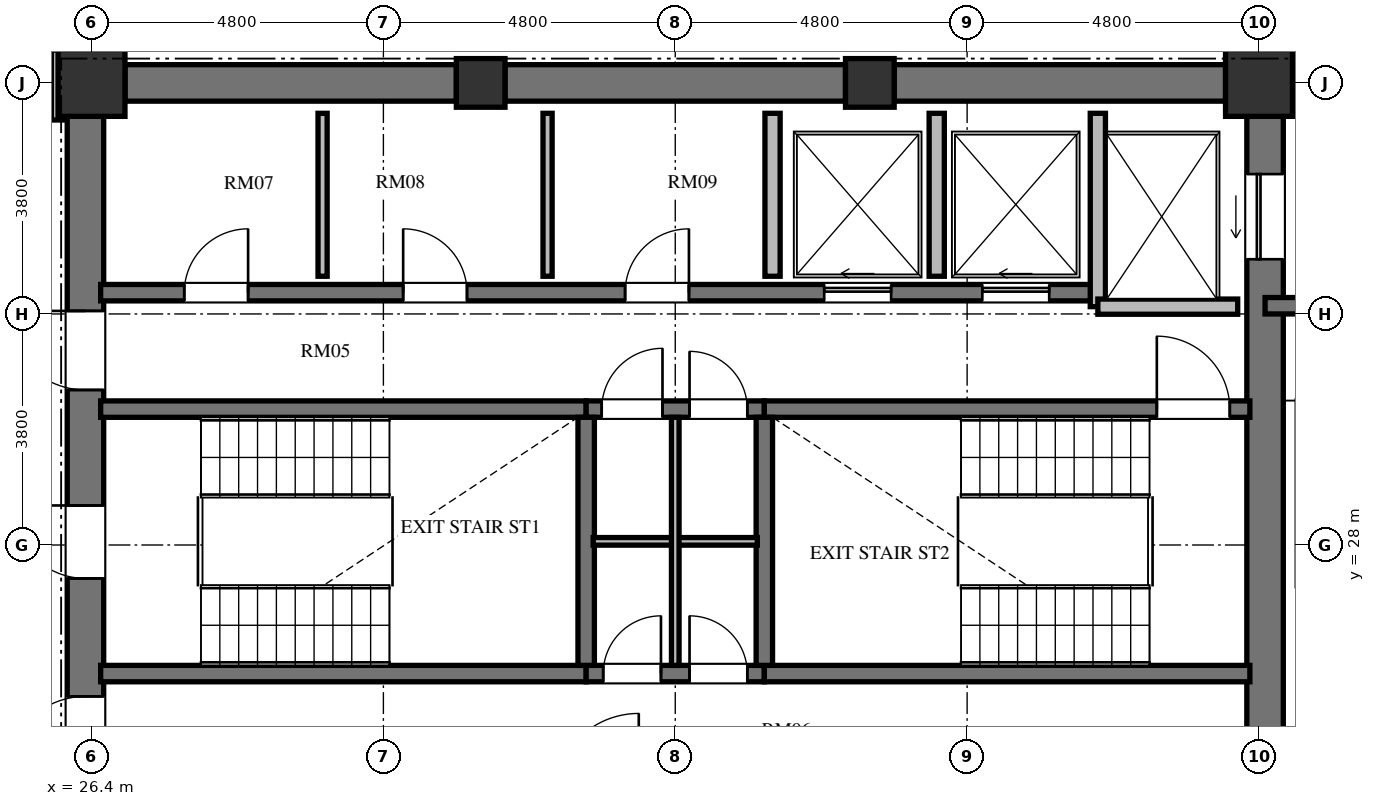
"""IFC4 building model, lengths in metres.
Left out: names, types, materials, properties, quantities, classifications, styles, units other than length and angle.
Written with IfcOpenShell. Run it as: python <this file> out.ifc"""

import sys

from ifc_helpers import new_model, si_unit, direction, frame, frame_2d, origin, origin_2d, place, context, subcontext, project, spatial, rectangle, extrude, element, fill, save


model = new_model("IFC4")
c1 = context("Model", 3, precision=1e-05, world=origin(), true_north=direction((0.0, 1.0)))
c2 = subcontext(c1, "Body", "Model", "MODEL_VIEW")
j1 = project(units=[si_unit("LENGTHUNIT", "METRE"), si_unit("PLANEANGLEUNIT", "RADIAN")], contexts=[c1])
p1 = place(None, origin())
s1 = spatial("IfcSite", under=j1, at=p1, CompositionType="ELEMENT")
p2 = place(p1, origin())
s2 = spatial("IfcBuilding", under=s1, at=p2, CompositionType="ELEMENT")
p3 = place(p2, frame((0.0, 0.0, 209.424)))
s3 = spatial("IfcBuildingStorey", under=s2, at=p3, CompositionType="ELEMENT", Elevation=209.424)
p4 = place(p3, frame((45.6, 35.6, 0.0), z_axis=(0.0, 0.0, 1.0), x_axis=(1.0, 0.0, 0.0)))
e1 = element("IfcColumn", 1, at=p4, inside=s3, PredefinedType="COLUMN", context=c2, shape_type="SweptSolid", body=[
    extrude(rectangle(XDim=1.1, YDim=1.1, at=origin_2d()), origin(), (0.0, 0.0, 1.0), 3.648),
])
for number, where, z_axis, x_axis in (
    (2, (39.2, 35.6, 0.0), (0.0, 0.0, 1.0), (1.0, 0.0, 0.0)),
    (3, (32.8, 35.6, 0.0), (0.0, 0.0, 1.0), (1.0, 0.0, 0.0)),
):
    element("IfcColumn", number, at=place(p3, frame(where, z_axis=z_axis, x_axis=x_axis)), inside=s3, PredefinedType="COLUMN", context=c2, shape_type="SweptSolid", body=[
        extrude(rectangle(XDim=0.8, YDim=0.8, at=origin_2d()), origin(), (0.0, 0.0, 1.0), 3.648),
    ])
p5 = place(p3, frame((26.4, 35.6, 0.0), z_axis=(0.0, 0.0, 1.0), x_axis=(1.0, 0.0, 0.0)))
e4 = element("IfcColumn", 4, at=p5, inside=s3, PredefinedType="COLUMN", context=c2, shape_type="SweptSolid", body=[
    extrude(rectangle(XDim=1.1, YDim=1.1, at=origin_2d()), origin(), (0.0, 0.0, 1.0), 3.648),
])
p6 = place(p3, frame((26.3, 20.95, 0.0), z_axis=(0.0, 0.0, 1.0), x_axis=(0.0, 1.0, 0.0)))
e5 = element("IfcWall", 5, at=p6, inside=s3, PredefinedType="SHEAR", context=c2, shape_type="SweptSolid", body=[
    extrude(rectangle(XDim=14.1, YDim=0.6, at=frame_2d((7.05, 0.0))), origin(), (0.0, 0.0, 1.0), 3.648),
])
p7 = place(p6, frame((6.5, 0.0, 0.0)))
e6 = element("IfcOpeningElement", 6, at=p7, cuts=e5, PredefinedType="OPENING", context=c2, shape_type="SweptSolid", body=[
    extrude(rectangle(XDim=1.2, YDim=2.15, at=frame_2d((0.6, 1.075))), frame((0.0, 0.31, 0.0), z_axis=(0.0, -1.0, 0.0), x_axis=(1.0, 0.0, 0.0)), (0.0, 0.0, 1.0), 0.62),
])
p8 = place(p6, frame((9.6, 0.0, 0.0)))
e7 = element("IfcOpeningElement", 7, at=p8, cuts=e5, PredefinedType="OPENING", context=c2, shape_type="SweptSolid", body=[
    extrude(rectangle(XDim=1.3, YDim=2.2, at=frame_2d((0.65, 1.1))), frame((0.0, 0.31, 0.0), z_axis=(0.0, -1.0, 0.0), x_axis=(1.0, 0.0, 0.0)), (0.0, 0.0, 1.0), 0.62),
])
p9 = place(p6, frame((3.26, 0.0, 0.0)))
e8 = element("IfcOpeningElement", 8, at=p9, cuts=e5, PredefinedType="OPENING", context=c2, shape_type="SweptSolid", body=[
    extrude(rectangle(XDim=1.3, YDim=2.2, at=frame_2d((0.65, 1.1))), frame((0.0, 0.31, 0.0), z_axis=(0.0, -1.0, 0.0), x_axis=(1.0, 0.0, 0.0)), (0.0, 0.0, 1.0), 0.62),
])
p10 = place(p3, frame((45.7, 20.95, 0.0), z_axis=(0.0, 0.0, 1.0), x_axis=(0.0, 1.0, 0.0)))
e9 = element("IfcWall", 9, at=p10, inside=s3, PredefinedType="SHEAR", context=c2, shape_type="SweptSolid", body=[
    extrude(rectangle(XDim=14.1, YDim=0.6, at=frame_2d((7.05, 0.0))), origin(), (0.0, 0.0, 1.0), 3.648),
])
p11 = place(p10, frame((11.75, 0.0, 0.0)))
e10 = element("IfcOpeningElement", 10, at=p11, cuts=e9, PredefinedType="OPENING", context=c2, shape_type="SweptSolid", body=[
    extrude(rectangle(XDim=1.4, YDim=2.3, at=frame_2d((0.7, 1.15))), frame((0.0, 0.31, 0.0), z_axis=(0.0, -1.0, 0.0), x_axis=(1.0, 0.0, 0.0)), (0.0, 0.0, 1.0), 0.62),
])
p12 = place(p10, frame((0.95, 0.0, 0.0)))
e11 = element("IfcOpeningElement", 11, at=p12, cuts=e9, PredefinedType="OPENING", context=c2, shape_type="SweptSolid", body=[
    extrude(rectangle(XDim=1.4, YDim=2.3, at=frame_2d((0.7, 1.15))), frame((0.0, 0.31, 0.0), z_axis=(0.0, -1.0, 0.0), x_axis=(1.0, 0.0, 0.0)), (0.0, 0.0, 1.0), 0.62),
])
p13 = place(p3, frame((26.95, 35.6, 0.0), z_axis=(0.0, 0.0, 1.0), x_axis=(1.0, 0.0, 0.0)))
e12 = element("IfcWall", 12, at=p13, inside=s3, PredefinedType="SHEAR", context=c2, shape_type="SweptSolid", body=[
    extrude(rectangle(XDim=5.45, YDim=0.6, at=frame_2d((2.725, 0.0))), origin(), (0.0, 0.0, 1.0), 3.648),
])
p14 = place(p3, frame((33.2, 35.6, 0.0), z_axis=(0.0, 0.0, 1.0), x_axis=(1.0, 0.0, 0.0)))
e13 = element("IfcWall", 13, at=p14, inside=s3, PredefinedType="SHEAR", context=c2, shape_type="SweptSolid", body=[
    extrude(rectangle(XDim=5.6, YDim=0.6, at=frame_2d((2.8, 0.0))), origin(), (0.0, 0.0, 1.0), 3.648),
])
p15 = place(p3, frame((39.6, 35.6, 0.0), z_axis=(0.0, 0.0, 1.0), x_axis=(1.0, 0.0, 0.0)))
e14 = element("IfcWall", 14, at=p15, inside=s3, PredefinedType="SHEAR", context=c2, shape_type="SweptSolid", body=[
    extrude(rectangle(XDim=5.45, YDim=0.6, at=frame_2d((2.725, 0.0))), origin(), (0.0, 0.0, 1.0), 3.648),
])
p16 = place(p3, frame((26.55, 30.235, 0.0), z_axis=(0.0, 0.0, 1.0), x_axis=(1.0, 0.0, 0.0)))
e15 = element("IfcWall", 15, at=p16, inside=s3, PredefinedType="SHEAR", context=c2, shape_type="SweptSolid", body=[
    extrude(rectangle(XDim=7.985, YDim=0.27, at=frame_2d((3.992, 0.0))), origin(), (0.0, 0.0, 1.0), 3.648),
])
p17 = place(p3, frame((34.535, 30.235, 0.0), z_axis=(0.0, 0.0, 1.0), x_axis=(1.0, 0.0, 0.0)))
e16 = element("IfcWall", 16, at=p17, inside=s3, PredefinedType="SHEAR", context=c2, shape_type="SweptSolid", body=[
    extrude(rectangle(XDim=2.93, YDim=0.27, at=frame_2d((1.465, 0.0))), origin(), (0.0, 0.0, 1.0), 3.648),
])
p18 = place(p17, frame((0.255, 0.0, 0.0)))
e17 = element("IfcOpeningElement", 17, at=p18, cuts=e16, PredefinedType="OPENING", context=c2, shape_type="SweptSolid", body=[
    extrude(rectangle(XDim=1.0, YDim=2.1, at=frame_2d((0.5, 1.05))), frame((0.0, 0.145, 0.0), z_axis=(0.0, -1.0, 0.0), x_axis=(1.0, 0.0, 0.0)), (0.0, 0.0, 1.0), 0.29),
])
p19 = place(p17, frame((1.7, 0.0, 0.0)))
e18 = element("IfcOpeningElement", 18, at=p19, cuts=e16, PredefinedType="OPENING", context=c2, shape_type="SweptSolid", body=[
    extrude(rectangle(XDim=0.95, YDim=2.1, at=frame_2d((0.475, 1.05))), frame((0.0, 0.145, 0.0), z_axis=(0.0, -1.0, 0.0), x_axis=(1.0, 0.0, 0.0)), (0.0, 0.0, 1.0), 0.29),
])
p20 = place(p3, frame((37.465, 30.235, 0.0), z_axis=(0.0, 0.0, 1.0), x_axis=(1.0, 0.0, 0.0)))
e19 = element("IfcWall", 19, at=p20, inside=s3, PredefinedType="SHEAR", context=c2, shape_type="SweptSolid", body=[
    extrude(rectangle(XDim=7.985, YDim=0.27, at=frame_2d((3.992, 0.0))), origin(), (0.0, 0.0, 1.0), 3.648),
])
p21 = place(p20, frame((6.455, 0.0, 0.0)))
e20 = element("IfcOpeningElement", 20, at=p21, cuts=e19, PredefinedType="OPENING", context=c2, shape_type="SweptSolid", body=[
    extrude(rectangle(XDim=1.2, YDim=2.15, at=frame_2d((0.6, 1.075))), frame((0.0, 0.145, 0.0), z_axis=(0.0, -1.0, 0.0), x_axis=(1.0, 0.0, 0.0)), (0.0, 0.0, 1.0), 0.29),
])
p22 = place(p3, frame((26.55, 25.885, 0.0), z_axis=(0.0, 0.0, 1.0), x_axis=(1.0, 0.0, 0.0)))
e21 = element("IfcWall", 21, at=p22, inside=s3, PredefinedType="SHEAR", context=c2, shape_type="SweptSolid", body=[
    extrude(rectangle(XDim=7.985, YDim=0.27, at=frame_2d((3.992, 0.0))), origin(), (0.0, 0.0, 1.0), 3.648),
])
p23 = place(p3, frame((34.535, 25.885, 0.0), z_axis=(0.0, 0.0, 1.0), x_axis=(1.0, 0.0, 0.0)))
e22 = element("IfcWall", 22, at=p23, inside=s3, PredefinedType="SHEAR", context=c2, shape_type="SweptSolid", body=[
    extrude(rectangle(XDim=2.93, YDim=0.27, at=frame_2d((1.465, 0.0))), origin(), (0.0, 0.0, 1.0), 3.648),
])
p24 = place(p23, frame((0.28, 0.0, 0.0)))
e23 = element("IfcOpeningElement", 23, at=p24, cuts=e22, PredefinedType="OPENING", context=c2, shape_type="SweptSolid", body=[
    extrude(rectangle(XDim=0.95, YDim=2.1, at=frame_2d((0.475, 1.05))), frame((0.0, 0.145, 0.0), z_axis=(0.0, -1.0, 0.0), x_axis=(1.0, 0.0, 0.0)), (0.0, 0.0, 1.0), 0.29),
])
p25 = place(p23, frame((1.7, 0.0, 0.0)))
e24 = element("IfcOpeningElement", 24, at=p25, cuts=e22, PredefinedType="OPENING", context=c2, shape_type="SweptSolid", body=[
    extrude(rectangle(XDim=0.95, YDim=2.1, at=frame_2d((0.475, 1.05))), frame((0.0, 0.145, 0.0), z_axis=(0.0, -1.0, 0.0), x_axis=(1.0, 0.0, 0.0)), (0.0, 0.0, 1.0), 0.29),
])
p26 = place(p3, frame((37.465, 25.885, 0.0), z_axis=(0.0, 0.0, 1.0), x_axis=(1.0, 0.0, 0.0)))
e25 = element("IfcWall", 25, at=p26, inside=s3, PredefinedType="SHEAR", context=c2, shape_type="SweptSolid", body=[
    extrude(rectangle(XDim=7.985, YDim=0.27, at=frame_2d((3.992, 0.0))), origin(), (0.0, 0.0, 1.0), 3.648),
])
for number, where, z_axis, x_axis in (
    (26, (34.535, 26.02, 0.0), (0.0, 0.0, 1.0), (0.0, 1.0, 0.0)),
    (27, (37.465, 26.02, 0.0), (0.0, 0.0, 1.0), (0.0, 1.0, 0.0)),
):
    element("IfcWall", number, at=place(p3, frame(where, z_axis=z_axis, x_axis=x_axis)), inside=s3, PredefinedType="SHEAR", context=c2, shape_type="SweptSolid", body=[
        extrude(rectangle(XDim=4.08, YDim=0.27, at=frame_2d((2.04, 0.0))), origin(), (0.0, 0.0, 1.0), 3.648),
    ])
p27 = place(p3, frame((34.65, 28.06, 0.0), z_axis=(0.0, 0.0, 1.0), x_axis=(1.0, 0.0, 0.0)))
e28 = element("IfcWall", 28, at=p27, inside=s3, PredefinedType="PARTITIONING", context=c2, shape_type="SweptSolid", body=[
    extrude(rectangle(XDim=2.7, YDim=0.125, at=frame_2d((1.35, 0.0))), origin(), (0.0, 0.0, 1.0), 3.448),
])
p28 = place(p3, frame((36.0, 26.02, 0.0), z_axis=(0.0, 0.0, 1.0), x_axis=(0.0, 1.0, 0.0)))
e29 = element("IfcWall", 29, at=p28, inside=s3, PredefinedType="PARTITIONING", context=c2, shape_type="SweptSolid", body=[
    extrude(rectangle(XDim=4.08, YDim=0.125, at=frame_2d((2.04, 0.0))), origin(), (0.0, 0.0, 1.0), 3.448),
])
p29 = place(p3, frame((26.55, 32.15, 0.0), z_axis=(0.0, 0.0, 1.0), x_axis=(1.0, 0.0, 0.0)))
e30 = element("IfcWall", 30, at=p29, inside=s3, PredefinedType="SHEAR", context=c2, shape_type="SweptSolid", body=[
    extrude(rectangle(XDim=16.4, YDim=0.27, at=frame_2d((8.2, 0.0))), origin(), (0.0, 0.0, 1.0), 3.648),
])
p30 = place(p29, frame((1.375, 0.0, 0.0)))
e31 = element("IfcOpeningElement", 31, at=p30, cuts=e30, PredefinedType="OPENING", context=c2, shape_type="SweptSolid", body=[
    extrude(rectangle(XDim=1.05, YDim=2.15, at=frame_2d((0.525, 1.075))), frame((0.0, 0.145, 0.0), z_axis=(0.0, -1.0, 0.0), x_axis=(1.0, 0.0, 0.0)), (0.0, 0.0, 1.0), 0.29),
])
p31 = place(p29, frame((4.975, 0.0, 0.0)))
e32 = element("IfcOpeningElement", 32, at=p31, cuts=e30, PredefinedType="OPENING", context=c2, shape_type="SweptSolid", body=[
    extrude(rectangle(XDim=1.05, YDim=2.15, at=frame_2d((0.525, 1.075))), frame((0.0, 0.145, 0.0), z_axis=(0.0, -1.0, 0.0), x_axis=(1.0, 0.0, 0.0)), (0.0, 0.0, 1.0), 0.29),
])
p32 = place(p29, frame((8.625, 0.0, 0.0)))
e33 = element("IfcOpeningElement", 33, at=p32, cuts=e30, PredefinedType="OPENING", context=c2, shape_type="SweptSolid", body=[
    extrude(rectangle(XDim=1.05, YDim=2.15, at=frame_2d((0.525, 1.075))), frame((0.0, 0.145, 0.0), z_axis=(0.0, -1.0, 0.0), x_axis=(1.0, 0.0, 0.0)), (0.0, 0.0, 1.0), 0.29),
])
p33 = place(p29, frame((11.9, 0.0, 0.0)))
e34 = element("IfcOpeningElement", 34, at=p33, cuts=e30, PredefinedType="OPENING", context=c2, shape_type="SweptSolid", body=[
    extrude(rectangle(XDim=1.1, YDim=2.2, at=frame_2d((0.55, 1.1))), frame((0.0, 0.145, 0.0), z_axis=(0.0, -1.0, 0.0), x_axis=(1.0, 0.0, 0.0)), (0.0, 0.0, 1.0), 0.29),
])
p34 = place(p29, frame((14.5, 0.0, 0.0)))
e35 = element("IfcOpeningElement", 35, at=p34, cuts=e30, PredefinedType="OPENING", context=c2, shape_type="SweptSolid", body=[
    extrude(rectangle(XDim=1.1, YDim=2.2, at=frame_2d((0.55, 1.1))), frame((0.0, 0.145, 0.0), z_axis=(0.0, -1.0, 0.0), x_axis=(1.0, 0.0, 0.0)), (0.0, 0.0, 1.0), 0.29),
])
p35 = place(p3, frame((42.95, 31.92, 0.0), z_axis=(0.0, 0.0, 1.0), x_axis=(0.0, 1.0, 0.0)))
e36 = element("IfcWall", 36, at=p35, inside=s3, PredefinedType="SOLIDWALL", context=c2, shape_type="SweptSolid", body=[
    extrude(rectangle(XDim=3.18, YDim=0.25, at=frame_2d((1.59, 0.0))), origin(), (0.0, 0.0, 1.0), 3.448),
])
p36 = place(p3, frame((42.95, 31.92, 0.0), z_axis=(0.0, 0.0, 1.0), x_axis=(1.0, 0.0, 0.0)))
e37 = element("IfcWall", 37, at=p36, inside=s3, PredefinedType="SOLIDWALL", context=c2, shape_type="SweptSolid", body=[
    extrude(rectangle(XDim=2.3, YDim=0.25, at=frame_2d((1.15, 0.0))), origin(), (0.0, 0.0, 1.0), 3.448),
])
for number, where, z_axis, x_axis in (
    (38, (37.6, 32.42, 0.0), (0.0, 0.0, 1.0), (0.0, 1.0, 0.0)),
    (39, (40.3, 32.42, 0.0), (0.0, 0.0, 1.0), (0.0, 1.0, 0.0)),
):
    element("IfcWall", number, at=place(p3, frame(where, z_axis=z_axis, x_axis=x_axis)), inside=s3, PredefinedType="SOLIDWALL", context=c2, shape_type="SweptSolid", body=[
        extrude(rectangle(XDim=2.68, YDim=0.25, at=frame_2d((1.34, 0.0))), origin(), (0.0, 0.0, 1.0), 3.448),
    ])
for number, where, z_axis, x_axis in (
    (40, (30.2, 32.42, 0.0), (0.0, 0.0, 1.0), (0.0, 1.0, 0.0)),
    (41, (33.9, 32.42, 0.0), (0.0, 0.0, 1.0), (0.0, 1.0, 0.0)),
):
    element("IfcWall", number, at=place(p3, frame(where, z_axis=z_axis, x_axis=x_axis)), inside=s3, PredefinedType="PARTITIONING", context=c2, shape_type="SweptSolid", body=[
        extrude(rectangle(XDim=2.68, YDim=0.15, at=frame_2d((1.34, 0.0))), origin(), (0.0, 0.0, 1.0), 3.448),
    ])
p37 = place(p3, frame((46.0, 35.98, 0.0), z_axis=(0.0, 0.0, 1.0), x_axis=(1.0, 0.0, 0.0)))
e42 = element("IfcWall", 42, at=p37, inside=s3, PredefinedType="SHEAR", context=c2, shape_type="SweptSolid", body=[
    extrude(rectangle(XDim=4.55, YDim=0.27, at=frame_2d((2.275, 0.0))), origin(), (0.0, 0.0, 1.0), 3.648),
])
p38 = place(p3, frame((45.7, 31.935, 0.0), z_axis=(0.0, 0.0, 1.0), x_axis=(1.0, 0.0, 0.0)))
e43 = element("IfcWall", 43, at=p38, inside=s3, PredefinedType="SHEAR", context=c2, shape_type="SweptSolid", body=[
    extrude(rectangle(XDim=4.715, YDim=0.27, at=frame_2d((2.357, 0.0))), origin(), (0.0, 0.0, 1.0), 3.648),
])
p39 = place(p3, frame((25.83, 36.14, 0.0), z_axis=(0.0, 0.0, 1.0), x_axis=(0.0, -1.0, 0.0)))
e44 = element("IfcWall", 44, at=p39, inside=s3, PredefinedType="PARTITIONING", context=c2, shape_type="SweptSolid", body=[
    extrude(rectangle(XDim=1.15, YDim=0.18, at=frame_2d((0.575, 0.0))), origin(), (0.0, 0.0, 1.0), 3.448),
])
p40 = place(p7, origin())
e45 = element("IfcDoor", 45, at=p40, inside=s3, OperationType="SINGLE_SWING_RIGHT", PredefinedType="DOOR", context=c2, shape_type="SweptSolid", body=[
    extrude(rectangle(XDim=1.2, YDim=2.15, at=frame_2d((0.6, 1.075))), frame((0.0, 0.025, 0.0), z_axis=(0.0, -1.0, 0.0), x_axis=(1.0, 0.0, 0.0)), (0.0, 0.0, 1.0), 0.05),
])
fill(e6, e45)
p41 = place(p21, origin())
e46 = element("IfcDoor", 46, at=p41, inside=s3, OperationType="SINGLE_SWING_LEFT", PredefinedType="DOOR", context=c2, shape_type="SweptSolid", body=[
    extrude(rectangle(XDim=1.2, YDim=2.15, at=frame_2d((0.6, 1.075))), frame((0.0, 0.025, 0.0), z_axis=(0.0, -1.0, 0.0), x_axis=(1.0, 0.0, 0.0)), (0.0, 0.0, 1.0), 0.05),
])
fill(e20, e46)
p42 = place(p24, origin())
e47 = element("IfcDoor", 47, at=p42, inside=s3, OperationType="SINGLE_SWING_RIGHT", PredefinedType="DOOR", context=c2, shape_type="SweptSolid", body=[
    extrude(rectangle(XDim=0.95, YDim=2.1, at=frame_2d((0.475, 1.05))), frame((0.0, 0.025, 0.0), z_axis=(0.0, -1.0, 0.0), x_axis=(1.0, 0.0, 0.0)), (0.0, 0.0, 1.0), 0.05),
])
fill(e23, e47)
p43 = place(p25, origin())
e48 = element("IfcDoor", 48, at=p43, inside=s3, OperationType="SINGLE_SWING_LEFT", PredefinedType="DOOR", context=c2, shape_type="SweptSolid", body=[
    extrude(rectangle(XDim=0.95, YDim=2.1, at=frame_2d((0.475, 1.05))), frame((0.0, 0.025, 0.0), z_axis=(0.0, -1.0, 0.0), x_axis=(1.0, 0.0, 0.0)), (0.0, 0.0, 1.0), 0.05),
])
fill(e24, e48)
p44 = place(p18, origin())
e49 = element("IfcDoor", 49, at=p44, inside=s3, OperationType="SINGLE_SWING_RIGHT", PredefinedType="DOOR", context=c2, shape_type="SweptSolid", body=[
    extrude(rectangle(XDim=1.0, YDim=2.1, at=frame_2d((0.5, 1.05))), frame((0.0, 0.025, 0.0), z_axis=(0.0, -1.0, 0.0), x_axis=(1.0, 0.0, 0.0)), (0.0, 0.0, 1.0), 0.05),
])
fill(e17, e49)
p45 = place(p19, origin())
e50 = element("IfcDoor", 50, at=p45, inside=s3, OperationType="SINGLE_SWING_LEFT", PredefinedType="DOOR", context=c2, shape_type="SweptSolid", body=[
    extrude(rectangle(XDim=0.95, YDim=2.1, at=frame_2d((0.475, 1.05))), frame((0.0, 0.025, 0.0), z_axis=(0.0, -1.0, 0.0), x_axis=(1.0, 0.0, 0.0)), (0.0, 0.0, 1.0), 0.05),
])
fill(e18, e50)
p46 = place(p8, origin())
e51 = element("IfcDoor", 51, at=p46, inside=s3, OperationType="SINGLE_SWING_RIGHT", PredefinedType="DOOR", context=c2, shape_type="SweptSolid", body=[
    extrude(rectangle(XDim=1.3, YDim=2.2, at=frame_2d((0.65, 1.1))), frame((0.0, 0.025, 0.0), z_axis=(0.0, -1.0, 0.0), x_axis=(1.0, 0.0, 0.0)), (0.0, 0.0, 1.0), 0.05),
])
fill(e7, e51)
p47 = place(p9, origin())
e52 = element("IfcDoor", 52, at=p47, inside=s3, OperationType="SINGLE_SWING_LEFT", PredefinedType="DOOR", context=c2, shape_type="SweptSolid", body=[
    extrude(rectangle(XDim=1.3, YDim=2.2, at=frame_2d((0.65, 1.1))), frame((0.0, 0.025, 0.0), z_axis=(0.0, -1.0, 0.0), x_axis=(1.0, 0.0, 0.0)), (0.0, 0.0, 1.0), 0.05),
])
fill(e8, e52)
p48 = place(p30, origin())
e53 = element("IfcDoor", 53, at=p48, inside=s3, OperationType="SINGLE_SWING_RIGHT", PredefinedType="DOOR", context=c2, shape_type="SweptSolid", body=[
    extrude(rectangle(XDim=1.05, YDim=2.15, at=frame_2d((0.525, 1.075))), frame((0.0, 0.025, 0.0), z_axis=(0.0, -1.0, 0.0), x_axis=(1.0, 0.0, 0.0)), (0.0, 0.0, 1.0), 0.05),
])
fill(e31, e53)
p49 = place(p31, origin())
e54 = element("IfcDoor", 54, at=p49, inside=s3, OperationType="SINGLE_SWING_LEFT", PredefinedType="DOOR", context=c2, shape_type="SweptSolid", body=[
    extrude(rectangle(XDim=1.05, YDim=2.15, at=frame_2d((0.525, 1.075))), frame((0.0, 0.025, 0.0), z_axis=(0.0, -1.0, 0.0), x_axis=(1.0, 0.0, 0.0)), (0.0, 0.0, 1.0), 0.05),
])
fill(e32, e54)
p50 = place(p32, origin())
e55 = element("IfcDoor", 55, at=p50, inside=s3, OperationType="SINGLE_SWING_RIGHT", PredefinedType="DOOR", context=c2, shape_type="SweptSolid", body=[
    extrude(rectangle(XDim=1.05, YDim=2.15, at=frame_2d((0.525, 1.075))), frame((0.0, 0.025, 0.0), z_axis=(0.0, -1.0, 0.0), x_axis=(1.0, 0.0, 0.0)), (0.0, 0.0, 1.0), 0.05),
])
fill(e33, e55)
p51 = place(p33, origin())
e56 = element("IfcDoor", 56, at=p51, inside=s3, OperationType="SLIDING_TO_LEFT", PredefinedType="DOOR", context=c2, shape_type="SweptSolid", body=[
    extrude(rectangle(XDim=1.1, YDim=2.2, at=frame_2d((0.55, 1.1))), frame((0.0, 0.025, 0.0), z_axis=(0.0, -1.0, 0.0), x_axis=(1.0, 0.0, 0.0)), (0.0, 0.0, 1.0), 0.05),
])
fill(e34, e56)
p52 = place(p34, origin())
e57 = element("IfcDoor", 57, at=p52, inside=s3, OperationType="SLIDING_TO_LEFT", PredefinedType="DOOR", context=c2, shape_type="SweptSolid", body=[
    extrude(rectangle(XDim=1.1, YDim=2.2, at=frame_2d((0.55, 1.1))), frame((0.0, 0.025, 0.0), z_axis=(0.0, -1.0, 0.0), x_axis=(1.0, 0.0, 0.0)), (0.0, 0.0, 1.0), 0.05),
])
fill(e35, e57)
p53 = place(p11, origin())
e58 = element("IfcDoor", 58, at=p53, inside=s3, OperationType="SLIDING_TO_LEFT", PredefinedType="DOOR", context=c2, shape_type="SweptSolid", body=[
    extrude(rectangle(XDim=1.4, YDim=2.3, at=frame_2d((0.7, 1.15))), frame((0.0, 0.025, 0.0), z_axis=(0.0, -1.0, 0.0), x_axis=(1.0, 0.0, 0.0)), (0.0, 0.0, 1.0), 0.05),
])
fill(e10, e58)
save(model, sys.argv[1])
